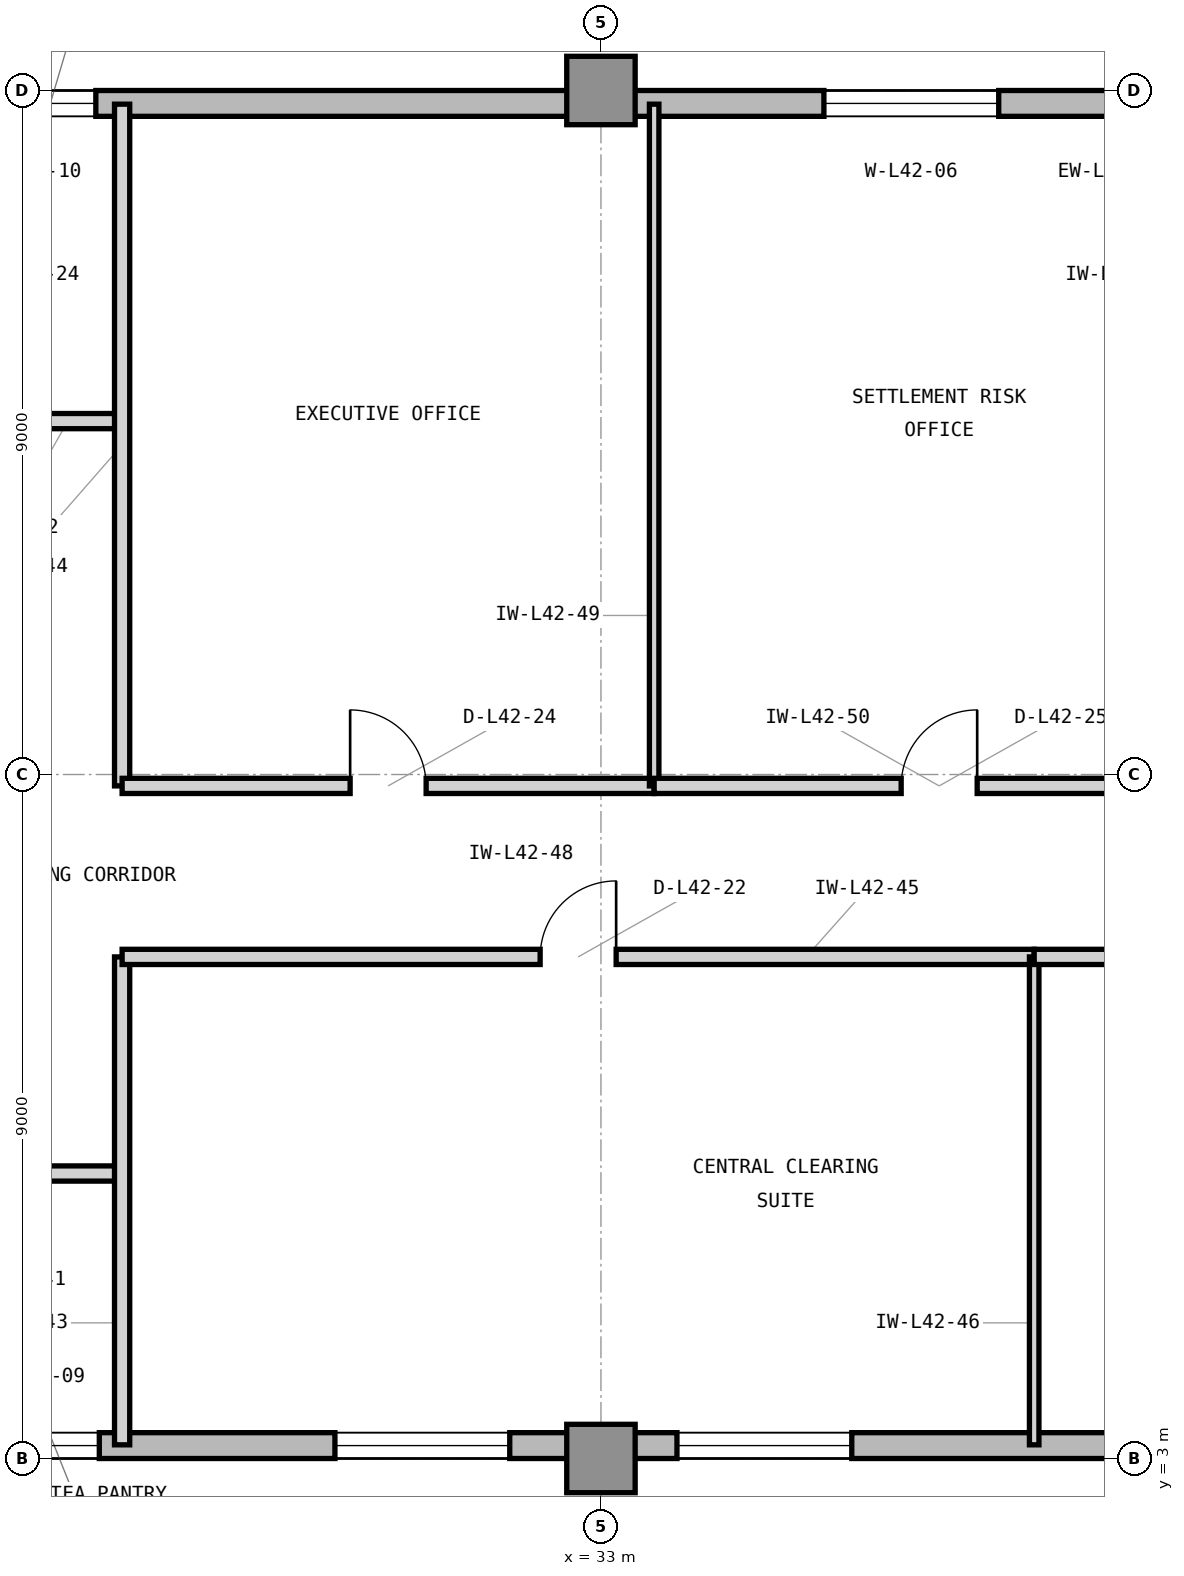
"""IFC4 building model, lengths in metres.
Left out: names, types, materials, properties, quantities, classifications, styles, units other than length and angle.
Written with IfcOpenShell. Run it as: python <this file> out.ifc"""

import sys

from ifc_helpers import new_model, si_unit, direction, frame, frame_2d, origin, origin_2d, place, context, subcontext, project, spatial, rectangle, extrude, element, fill, save


model = new_model("IFC4")
c1 = context("Model", 3, precision=1e-05, world=origin(), true_north=direction((0.0, 1.0)))
c2 = subcontext(c1, "Body", "Model", "MODEL_VIEW")
j1 = project(units=[si_unit("LENGTHUNIT", "METRE"), si_unit("PLANEANGLEUNIT", "RADIAN")], contexts=[c1])
p1 = place(None, origin())
s1 = spatial("IfcSite", under=j1, at=p1, CompositionType="ELEMENT")
p2 = place(p1, origin())
s2 = spatial("IfcBuilding", under=s1, at=p2, CompositionType="ELEMENT")
p3 = place(p2, frame((0.0, 0.0, 176.1)))
s3 = spatial("IfcBuildingStorey", under=s2, at=p3, CompositionType="ELEMENT", Elevation=176.1)
for number, where, z_axis, x_axis in (
    (1, (33.0, 3.0, 0.0), (0.0, 0.0, 1.0), (1.0, 0.0, 0.0)),
    (2, (33.0, 21.0, 0.0), (0.0, 0.0, 1.0), (1.0, 0.0, 0.0)),
):
    element("IfcColumn", number, at=place(p3, frame(where, z_axis=z_axis, x_axis=x_axis)), inside=s3, PredefinedType="COLUMN", context=c2, shape_type="SweptSolid", body=[
        extrude(rectangle(XDim=0.9, YDim=0.9, at=origin_2d()), origin(), (0.0, 0.0, 1.0), 3.9),
    ])
p4 = place(p3, frame((23.9, 3.17, 0.0), z_axis=(0.0, 0.0, 1.0), x_axis=(1.0, 0.0, 0.0)))
e3 = element("IfcWall", 3, at=p4, inside=s3, PredefinedType="STANDARD", context=c2, shape_type="SweptSolid", body=[
    extrude(rectangle(XDim=31.5, YDim=0.34, at=frame_2d((15.75, 0.0))), origin(), (0.0, 0.0, 1.0), 3.7),
])
p5 = place(p4, frame((5.6, 0.0, 0.9)))
e4 = element("IfcOpeningElement", 4, at=p5, cuts=e3, PredefinedType="OPENING", context=c2, shape_type="SweptSolid", body=[
    extrude(rectangle(XDim=2.3, YDim=2.2, at=frame_2d((1.15, 1.1))), frame((0.0, 0.18, 0.0), z_axis=(0.0, -1.0, 0.0), x_axis=(1.0, 0.0, 0.0)), (0.0, 0.0, 1.0), 0.36),
])
p6 = place(p4, frame((10.1, 0.0, 0.9)))
e5 = element("IfcOpeningElement", 5, at=p6, cuts=e3, PredefinedType="OPENING", context=c2, shape_type="SweptSolid", body=[
    extrude(rectangle(XDim=2.3, YDim=2.2, at=frame_2d((1.15, 1.1))), frame((0.0, 0.18, 0.0), z_axis=(0.0, -1.0, 0.0), x_axis=(1.0, 0.0, 0.0)), (0.0, 0.0, 1.0), 0.36),
])
p7 = place(p4, frame((19.1, 0.0, 0.9)))
e6 = element("IfcOpeningElement", 6, at=p7, cuts=e3, PredefinedType="OPENING", context=c2, shape_type="SweptSolid", body=[
    extrude(rectangle(XDim=2.3, YDim=2.2, at=frame_2d((1.15, 1.1))), frame((0.0, 0.18, 0.0), z_axis=(0.0, -1.0, 0.0), x_axis=(1.0, 0.0, 0.0)), (0.0, 0.0, 1.0), 0.36),
])
p8 = place(p4, frame((0.9, 0.0, 0.9)))
e7 = element("IfcOpeningElement", 7, at=p8, cuts=e3, PredefinedType="OPENING", context=c2, shape_type="SweptSolid", body=[
    extrude(rectangle(XDim=1.6, YDim=2.2, at=frame_2d((0.8, 1.1))), frame((0.0, 0.18, 0.0), z_axis=(0.0, -1.0, 0.0), x_axis=(1.0, 0.0, 0.0)), (0.0, 0.0, 1.0), 0.36),
])
p9 = place(p3, frame((55.4, 20.83, 0.0), z_axis=(0.0, 0.0, 1.0), x_axis=(-1.0, 0.0, 0.0)))
e8 = element("IfcWall", 8, at=p9, inside=s3, PredefinedType="STANDARD", context=c2, shape_type="SweptSolid", body=[
    extrude(rectangle(XDim=31.4, YDim=0.34, at=frame_2d((15.7, 0.0))), origin(), (0.0, 0.0, 1.0), 3.7),
])
p10 = place(p9, frame((17.167, 0.0, 0.9)))
e9 = element("IfcOpeningElement", 9, at=p10, cuts=e8, PredefinedType="OPENING", context=c2, shape_type="SweptSolid", body=[
    extrude(rectangle(XDim=2.3, YDim=2.2, at=frame_2d((1.15, 1.1))), frame((0.0, 0.18, 0.0), z_axis=(0.0, -1.0, 0.0), x_axis=(1.0, 0.0, 0.0)), (0.0, 0.0, 1.0), 0.36),
])
p11 = place(p9, frame((29.046, 0.0, 0.9)))
e10 = element("IfcOpeningElement", 10, at=p11, cuts=e8, PredefinedType="OPENING", context=c2, shape_type="SweptSolid", body=[
    extrude(rectangle(XDim=1.6, YDim=2.2, at=frame_2d((0.8, 1.1))), frame((0.0, 0.18, 0.0), z_axis=(0.0, -1.0, 0.0), x_axis=(1.0, 0.0, 0.0)), (0.0, 0.0, 1.0), 0.36),
])
p12 = place(p9, frame((8.675, 0.0, 0.9)))
e11 = element("IfcOpeningElement", 11, at=p12, cuts=e8, PredefinedType="OPENING", context=c2, shape_type="SweptSolid", body=[
    extrude(rectangle(XDim=2.3, YDim=2.2, at=frame_2d((1.15, 1.1))), frame((0.0, 0.18, 0.0), z_axis=(0.0, -1.0, 0.0), x_axis=(1.0, 0.0, 0.0)), (0.0, 0.0, 1.0), 0.36),
])
p13 = place(p3, frame((23.85, 6.75, 0.0), z_axis=(0.0, 0.0, 1.0), x_axis=(1.0, 0.0, 0.0)))
e12 = element("IfcWall", 12, at=p13, inside=s3, PredefinedType="PARTITIONING", context=c2, shape_type="SweptSolid", body=[
    extrude(rectangle(XDim=2.85, YDim=0.2, at=frame_2d((1.425, 0.0))), origin(), (0.0, 0.0, 1.0), 3.69),
])
p14 = place(p13, frame((0.7, 0.0, 0.0)))
e13 = element("IfcOpeningElement", 13, at=p14, cuts=e12, PredefinedType="OPENING", context=c2, shape_type="SweptSolid", body=[
    extrude(rectangle(XDim=1.0, YDim=2.15, at=frame_2d((0.5, 1.075))), frame((0.0, 0.11, 0.0), z_axis=(0.0, -1.0, 0.0), x_axis=(1.0, 0.0, 0.0)), (0.0, 0.0, 1.0), 0.22),
])
p15 = place(p3, frame((23.85, 16.65, 0.0), z_axis=(0.0, 0.0, 1.0), x_axis=(1.0, 0.0, 0.0)))
e14 = element("IfcWall", 14, at=p15, inside=s3, PredefinedType="PARTITIONING", context=c2, shape_type="SweptSolid", body=[
    extrude(rectangle(XDim=2.85, YDim=0.2, at=frame_2d((1.425, 0.0))), origin(), (0.0, 0.0, 1.0), 3.69),
])
p16 = place(p15, frame((0.7, 0.0, 0.0)))
e15 = element("IfcOpeningElement", 15, at=p16, cuts=e14, PredefinedType="OPENING", context=c2, shape_type="SweptSolid", body=[
    extrude(rectangle(XDim=1.0, YDim=2.15, at=frame_2d((0.5, 1.075))), frame((0.0, 0.11, 0.0), z_axis=(0.0, -1.0, 0.0), x_axis=(1.0, 0.0, 0.0)), (0.0, 0.0, 1.0), 0.22),
])
p17 = place(p3, frame((26.7, 3.18, 0.0), z_axis=(0.0, 0.0, 1.0), x_axis=(0.0, 1.0, 0.0)))
e16 = element("IfcWall", 16, at=p17, inside=s3, PredefinedType="PARTITIONING", context=c2, shape_type="SweptSolid", body=[
    extrude(rectangle(XDim=6.42, YDim=0.2, at=frame_2d((3.21, 0.0))), origin(), (0.0, 0.0, 1.0), 3.69),
])
p18 = place(p3, frame((26.7, 11.85, 0.0), z_axis=(0.0, 0.0, 1.0), x_axis=(0.0, 1.0, 0.0)))
e17 = element("IfcWall", 17, at=p18, inside=s3, PredefinedType="PARTITIONING", context=c2, shape_type="SweptSolid", body=[
    extrude(rectangle(XDim=8.97, YDim=0.2, at=frame_2d((4.485, 0.0))), origin(), (0.0, 0.0, 1.0), 3.69),
])
p19 = place(p3, frame((26.7, 9.6, 0.0), z_axis=(0.0, 0.0, 1.0), x_axis=(1.0, 0.0, 0.0)))
e18 = element("IfcWall", 18, at=p19, inside=s3, PredefinedType="PARTITIONING", context=c2, shape_type="SweptSolid", body=[
    extrude(rectangle(XDim=12.0, YDim=0.2, at=frame_2d((6.0, 0.0))), origin(), (0.0, 0.0, 1.0), 3.69),
])
p20 = place(p19, frame((5.5, 0.0, 0.0)))
e19 = element("IfcOpeningElement", 19, at=p20, cuts=e18, PredefinedType="OPENING", context=c2, shape_type="SweptSolid", body=[
    extrude(rectangle(XDim=1.0, YDim=2.15, at=frame_2d((0.5, 1.075))), frame((0.0, 0.11, 0.0), z_axis=(0.0, -1.0, 0.0), x_axis=(1.0, 0.0, 0.0)), (0.0, 0.0, 1.0), 0.22),
])
p21 = place(p3, frame((38.7, 3.18, 0.0), z_axis=(0.0, 0.0, 1.0), x_axis=(0.0, 1.0, 0.0)))
e20 = element("IfcWall", 20, at=p21, inside=s3, PredefinedType="PARTITIONING", context=c2, shape_type="SweptSolid", body=[
    extrude(rectangle(XDim=6.42, YDim=0.125, at=frame_2d((3.21, 0.0))), origin(), (0.0, 0.0, 1.0), 3.69),
])
p22 = place(p3, frame((38.7, 9.6, 0.0), z_axis=(0.0, 0.0, 1.0), x_axis=(1.0, 0.0, 0.0)))
e21 = element("IfcWall", 21, at=p22, inside=s3, PredefinedType="PARTITIONING", context=c2, shape_type="SweptSolid", body=[
    extrude(rectangle(XDim=11.3, YDim=0.2, at=frame_2d((5.65, 0.0))), origin(), (0.0, 0.0, 1.0), 3.69),
])
p23 = place(p22, frame((4.9, 0.0, 0.0)))
e22 = element("IfcOpeningElement", 22, at=p23, cuts=e21, PredefinedType="OPENING", context=c2, shape_type="SweptSolid", body=[
    extrude(rectangle(XDim=1.5, YDim=2.3, at=frame_2d((0.75, 1.15))), frame((0.0, 0.11, 0.0), z_axis=(0.0, -1.0, 0.0), x_axis=(1.0, 0.0, 0.0)), (0.0, 0.0, 1.0), 0.22),
])
p24 = place(p3, frame((26.7, 11.85, 0.0), z_axis=(0.0, 0.0, 1.0), x_axis=(1.0, 0.0, 0.0)))
e23 = element("IfcWall", 23, at=p24, inside=s3, PredefinedType="PARTITIONING", context=c2, shape_type="SweptSolid", body=[
    extrude(rectangle(XDim=7.0, YDim=0.2, at=frame_2d((3.5, 0.0))), origin(), (0.0, 0.0, 1.0), 3.69),
])
p25 = place(p24, frame((3.0, 0.0, 0.0)))
e24 = element("IfcOpeningElement", 24, at=p25, cuts=e23, PredefinedType="OPENING", context=c2, shape_type="SweptSolid", body=[
    extrude(rectangle(XDim=1.0, YDim=2.15, at=frame_2d((0.5, 1.075))), frame((0.0, 0.11, 0.0), z_axis=(0.0, -1.0, 0.0), x_axis=(1.0, 0.0, 0.0)), (0.0, 0.0, 1.0), 0.22),
])
p26 = place(p3, frame((33.7, 11.85, 0.0), z_axis=(0.0, 0.0, 1.0), x_axis=(0.0, 1.0, 0.0)))
e25 = element("IfcWall", 25, at=p26, inside=s3, PredefinedType="PARTITIONING", context=c2, shape_type="SweptSolid", body=[
    extrude(rectangle(XDim=8.97, YDim=0.125, at=frame_2d((4.485, 0.0))), origin(), (0.0, 0.0, 1.0), 3.69),
])
p27 = place(p3, frame((33.7, 11.85, 0.0), z_axis=(0.0, 0.0, 1.0), x_axis=(1.0, 0.0, 0.0)))
e26 = element("IfcWall", 26, at=p27, inside=s3, PredefinedType="PARTITIONING", context=c2, shape_type="SweptSolid", body=[
    extrude(rectangle(XDim=7.5, YDim=0.2, at=frame_2d((3.75, 0.0))), origin(), (0.0, 0.0, 1.0), 3.69),
])
p28 = place(p27, frame((3.25, 0.0, 0.0)))
e27 = element("IfcOpeningElement", 27, at=p28, cuts=e26, PredefinedType="OPENING", context=c2, shape_type="SweptSolid", body=[
    extrude(rectangle(XDim=1.0, YDim=2.15, at=frame_2d((0.5, 1.075))), frame((0.0, 0.11, 0.0), z_axis=(0.0, -1.0, 0.0), x_axis=(1.0, 0.0, 0.0)), (0.0, 0.0, 1.0), 0.22),
])
p29 = place(p5, origin())
e28 = element("IfcWindow", 28, at=p29, inside=s3, PartitioningType="SINGLE_PANEL", PredefinedType="WINDOW", context=c2, shape_type="SweptSolid", body=[
    extrude(rectangle(XDim=2.3, YDim=2.2, at=frame_2d((1.15, 1.1))), frame((0.0, 0.11, 0.0), z_axis=(0.0, -1.0, 0.0), x_axis=(1.0, 0.0, 0.0)), (0.0, 0.0, 1.0), 0.06),
])
fill(e4, e28)
p30 = place(p6, origin())
e29 = element("IfcWindow", 29, at=p30, inside=s3, PartitioningType="SINGLE_PANEL", PredefinedType="WINDOW", context=c2, shape_type="SweptSolid", body=[
    extrude(rectangle(XDim=2.3, YDim=2.2, at=frame_2d((1.15, 1.1))), frame((0.0, 0.11, 0.0), z_axis=(0.0, -1.0, 0.0), x_axis=(1.0, 0.0, 0.0)), (0.0, 0.0, 1.0), 0.06),
])
fill(e5, e29)
p31 = place(p10, origin())
e30 = element("IfcWindow", 30, at=p31, inside=s3, PartitioningType="SINGLE_PANEL", PredefinedType="WINDOW", context=c2, shape_type="SweptSolid", body=[
    extrude(rectangle(XDim=2.3, YDim=2.2, at=frame_2d((1.15, 1.1))), frame((0.0, 0.11, 0.0), z_axis=(0.0, -1.0, 0.0), x_axis=(1.0, 0.0, 0.0)), (0.0, 0.0, 1.0), 0.06),
])
fill(e9, e30)
p32 = place(p20, origin())
e31 = element("IfcDoor", 31, at=p32, inside=s3, OperationType="SINGLE_SWING_RIGHT", PredefinedType="DOOR", context=c2, shape_type="SweptSolid", body=[
    extrude(rectangle(XDim=1.0, YDim=2.15, at=frame_2d((0.5, 1.075))), frame((0.0, 0.025, 0.0), z_axis=(0.0, -1.0, 0.0), x_axis=(1.0, 0.0, 0.0)), (0.0, 0.0, 1.0), 0.05),
])
fill(e19, e31)
p33 = place(p25, origin())
e32 = element("IfcDoor", 32, at=p33, inside=s3, OperationType="SINGLE_SWING_LEFT", PredefinedType="DOOR", context=c2, shape_type="SweptSolid", body=[
    extrude(rectangle(XDim=1.0, YDim=2.15, at=frame_2d((0.5, 1.075))), frame((0.0, 0.025, 0.0), z_axis=(0.0, -1.0, 0.0), x_axis=(1.0, 0.0, 0.0)), (0.0, 0.0, 1.0), 0.05),
])
fill(e24, e32)
p34 = place(p28, origin())
e33 = element("IfcDoor", 33, at=p34, inside=s3, OperationType="SINGLE_SWING_RIGHT", PredefinedType="DOOR", context=c2, shape_type="SweptSolid", body=[
    extrude(rectangle(XDim=1.0, YDim=2.15, at=frame_2d((0.5, 1.075))), frame((0.0, 0.025, 0.0), z_axis=(0.0, -1.0, 0.0), x_axis=(1.0, 0.0, 0.0)), (0.0, 0.0, 1.0), 0.05),
])
fill(e27, e33)
p35 = place(p8, origin())
e34 = element("IfcWindow", 34, at=p35, inside=s3, PartitioningType="SINGLE_PANEL", PredefinedType="WINDOW", context=c2, shape_type="SweptSolid", body=[
    extrude(rectangle(XDim=1.6, YDim=2.2, at=frame_2d((0.8, 1.1))), frame((0.0, 0.11, 0.0), z_axis=(0.0, -1.0, 0.0), x_axis=(1.0, 0.0, 0.0)), (0.0, 0.0, 1.0), 0.06),
])
fill(e7, e34)
p36 = place(p11, origin())
e35 = element("IfcWindow", 35, at=p36, inside=s3, PartitioningType="SINGLE_PANEL", PredefinedType="WINDOW", context=c2, shape_type="SweptSolid", body=[
    extrude(rectangle(XDim=1.6, YDim=2.2, at=frame_2d((0.8, 1.1))), frame((0.0, 0.11, 0.0), z_axis=(0.0, -1.0, 0.0), x_axis=(1.0, 0.0, 0.0)), (0.0, 0.0, 1.0), 0.06),
])
fill(e10, e35)
save(model, sys.argv[1])
